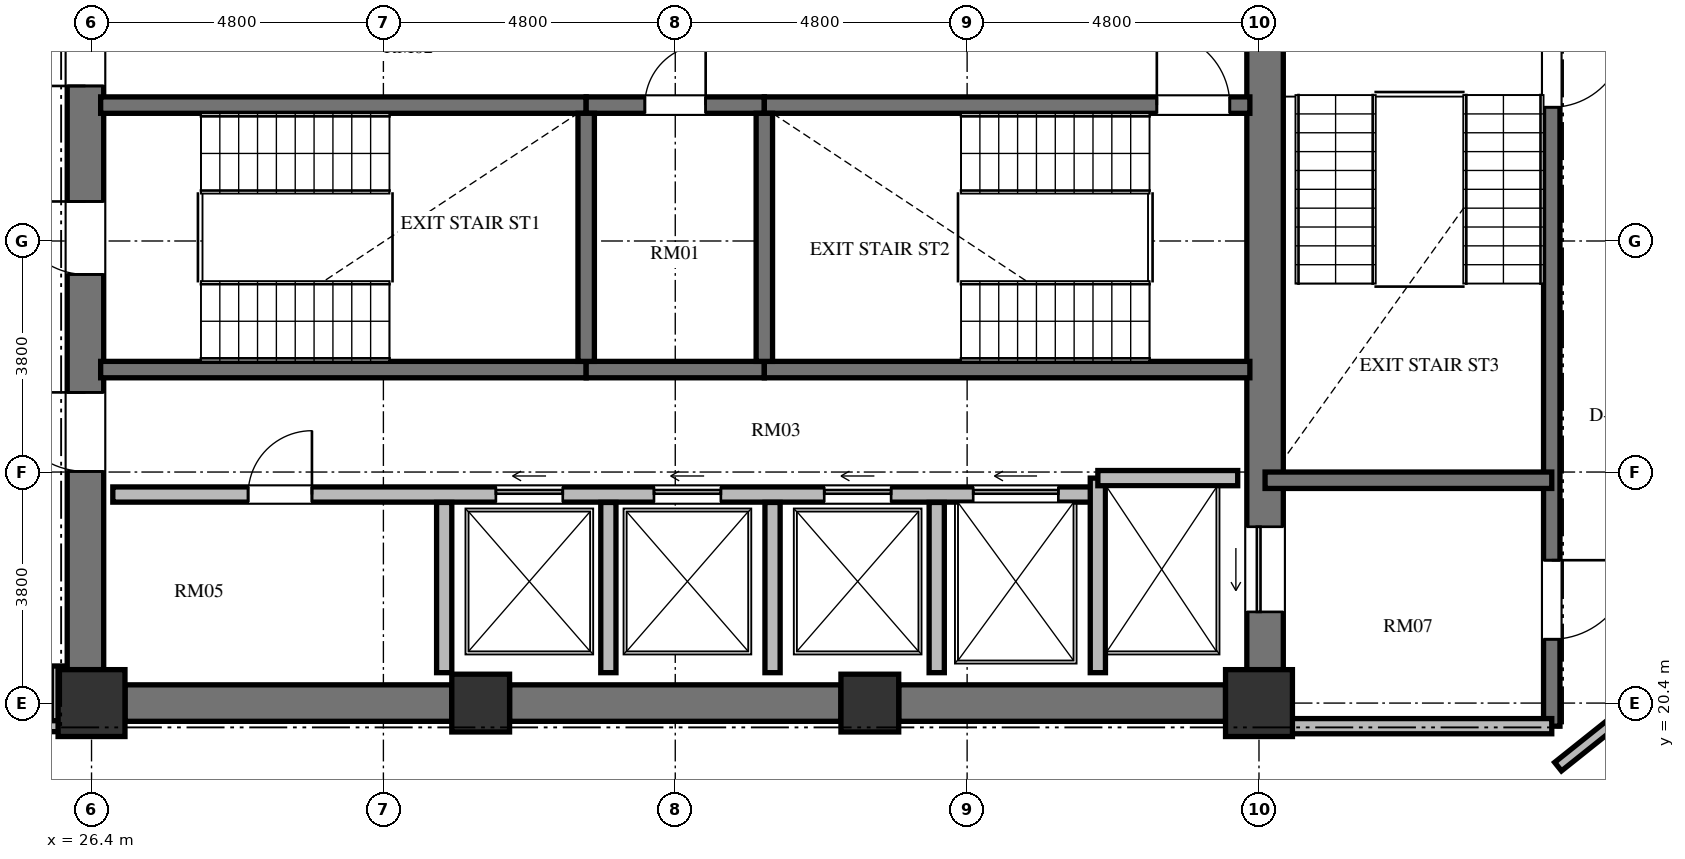
"""IFC4 building model, lengths in metres.
Left out: names, types, materials, properties, quantities, classifications, styles, units other than length and angle.
Written with IfcOpenShell. Run it as: python <this file> out.ifc"""

import sys

from ifc_helpers import new_model, si_unit, direction, frame, frame_2d, origin, origin_2d, place, context, subcontext, project, spatial, rectangle, extrude, element, fill, save


model = new_model("IFC4")
c1 = context("Model", 3, precision=1e-05, world=origin(), true_north=direction((0.0, 1.0)))
c2 = subcontext(c1, "Body", "Model", "MODEL_VIEW")
j1 = project(units=[si_unit("LENGTHUNIT", "METRE"), si_unit("PLANEANGLEUNIT", "RADIAN")], contexts=[c1])
p1 = place(None, origin())
s1 = spatial("IfcSite", under=j1, at=p1, CompositionType="ELEMENT")
p2 = place(p1, origin())
s2 = spatial("IfcBuilding", under=s1, at=p2, CompositionType="ELEMENT")
p3 = place(p2, frame((0.0, 0.0, 171.12)))
s3 = spatial("IfcBuildingStorey", under=s2, at=p3, CompositionType="ELEMENT", Elevation=171.12)
p4 = place(p3, frame((26.4, 20.4, 0.0), z_axis=(0.0, 0.0, 1.0), x_axis=(1.0, 0.0, 0.0)))
e1 = element("IfcColumn", 1, at=p4, inside=s3, PredefinedType="COLUMN", context=c2, shape_type="SweptSolid", body=[
    extrude(rectangle(XDim=1.1, YDim=1.1, at=origin_2d()), origin(), (0.0, 0.0, 1.0), 3.648),
])
for number, where, z_axis, x_axis in (
    (2, (32.8, 20.4, 0.0), (0.0, 0.0, 1.0), (1.0, 0.0, 0.0)),
    (3, (39.2, 20.4, 0.0), (0.0, 0.0, 1.0), (1.0, 0.0, 0.0)),
):
    element("IfcColumn", number, at=place(p3, frame(where, z_axis=z_axis, x_axis=x_axis)), inside=s3, PredefinedType="COLUMN", context=c2, shape_type="SweptSolid", body=[
        extrude(rectangle(XDim=0.95, YDim=0.95, at=origin_2d()), origin(), (0.0, 0.0, 1.0), 3.648),
    ])
p5 = place(p3, frame((45.6, 20.4, 0.0), z_axis=(0.0, 0.0, 1.0), x_axis=(1.0, 0.0, 0.0)))
e4 = element("IfcColumn", 4, at=p5, inside=s3, PredefinedType="COLUMN", context=c2, shape_type="SweptSolid", body=[
    extrude(rectangle(XDim=1.1, YDim=1.1, at=origin_2d()), origin(), (0.0, 0.0, 1.0), 3.648),
])
p6 = place(p3, frame((26.3, 20.95, 0.0), z_axis=(0.0, 0.0, 1.0), x_axis=(0.0, 1.0, 0.0)))
e5 = element("IfcWall", 5, at=p6, inside=s3, PredefinedType="SHEAR", context=c2, shape_type="SweptSolid", body=[
    extrude(rectangle(XDim=14.1, YDim=0.6, at=frame_2d((7.05, 0.0))), origin(), (0.0, 0.0, 1.0), 3.648),
])
p7 = place(p6, frame((6.5, 0.0, 0.0)))
e6 = element("IfcOpeningElement", 6, at=p7, cuts=e5, PredefinedType="OPENING", context=c2, shape_type="SweptSolid", body=[
    extrude(rectangle(XDim=1.2, YDim=2.15, at=frame_2d((0.6, 1.075))), frame((0.0, 0.31, 0.0), z_axis=(0.0, -1.0, 0.0), x_axis=(1.0, 0.0, 0.0)), (0.0, 0.0, 1.0), 0.62),
])
p8 = place(p6, frame((9.6, 0.0, 0.0)))
e7 = element("IfcOpeningElement", 7, at=p8, cuts=e5, PredefinedType="OPENING", context=c2, shape_type="SweptSolid", body=[
    extrude(rectangle(XDim=1.3, YDim=2.2, at=frame_2d((0.65, 1.1))), frame((0.0, 0.31, 0.0), z_axis=(0.0, -1.0, 0.0), x_axis=(1.0, 0.0, 0.0)), (0.0, 0.0, 1.0), 0.62),
])
p9 = place(p6, frame((3.26, 0.0, 0.0)))
e8 = element("IfcOpeningElement", 8, at=p9, cuts=e5, PredefinedType="OPENING", context=c2, shape_type="SweptSolid", body=[
    extrude(rectangle(XDim=1.3, YDim=2.2, at=frame_2d((0.65, 1.1))), frame((0.0, 0.31, 0.0), z_axis=(0.0, -1.0, 0.0), x_axis=(1.0, 0.0, 0.0)), (0.0, 0.0, 1.0), 0.62),
])
p10 = place(p3, frame((45.7, 20.95, 0.0), z_axis=(0.0, 0.0, 1.0), x_axis=(0.0, 1.0, 0.0)))
e9 = element("IfcWall", 9, at=p10, inside=s3, PredefinedType="SHEAR", context=c2, shape_type="SweptSolid", body=[
    extrude(rectangle(XDim=14.1, YDim=0.6, at=frame_2d((7.05, 0.0))), origin(), (0.0, 0.0, 1.0), 3.648),
])
p11 = place(p10, frame((11.75, 0.0, 0.0)))
e10 = element("IfcOpeningElement", 10, at=p11, cuts=e9, PredefinedType="OPENING", context=c2, shape_type="SweptSolid", body=[
    extrude(rectangle(XDim=1.4, YDim=2.3, at=frame_2d((0.7, 1.15))), frame((0.0, 0.31, 0.0), z_axis=(0.0, -1.0, 0.0), x_axis=(1.0, 0.0, 0.0)), (0.0, 0.0, 1.0), 0.62),
])
p12 = place(p10, frame((0.95, 0.0, 0.0)))
e11 = element("IfcOpeningElement", 11, at=p12, cuts=e9, PredefinedType="OPENING", context=c2, shape_type="SweptSolid", body=[
    extrude(rectangle(XDim=1.4, YDim=2.3, at=frame_2d((0.7, 1.15))), frame((0.0, 0.31, 0.0), z_axis=(0.0, -1.0, 0.0), x_axis=(1.0, 0.0, 0.0)), (0.0, 0.0, 1.0), 0.62),
])
p13 = place(p3, frame((26.95, 20.4, 0.0), z_axis=(0.0, 0.0, 1.0), x_axis=(1.0, 0.0, 0.0)))
e12 = element("IfcWall", 12, at=p13, inside=s3, PredefinedType="SHEAR", context=c2, shape_type="SweptSolid", body=[
    extrude(rectangle(XDim=5.375, YDim=0.6, at=frame_2d((2.688, 0.0))), origin(), (0.0, 0.0, 1.0), 3.648),
])
p14 = place(p3, frame((33.275, 20.4, 0.0), z_axis=(0.0, 0.0, 1.0), x_axis=(1.0, 0.0, 0.0)))
e13 = element("IfcWall", 13, at=p14, inside=s3, PredefinedType="SHEAR", context=c2, shape_type="SweptSolid", body=[
    extrude(rectangle(XDim=5.45, YDim=0.6, at=frame_2d((2.725, 0.0))), origin(), (0.0, 0.0, 1.0), 3.648),
])
p15 = place(p3, frame((39.675, 20.4, 0.0), z_axis=(0.0, 0.0, 1.0), x_axis=(1.0, 0.0, 0.0)))
e14 = element("IfcWall", 14, at=p15, inside=s3, PredefinedType="SHEAR", context=c2, shape_type="SweptSolid", body=[
    extrude(rectangle(XDim=5.375, YDim=0.6, at=frame_2d((2.688, 0.0))), origin(), (0.0, 0.0, 1.0), 3.648),
])
p16 = place(p3, frame((26.55, 30.235, 0.0), z_axis=(0.0, 0.0, 1.0), x_axis=(1.0, 0.0, 0.0)))
e15 = element("IfcWall", 15, at=p16, inside=s3, PredefinedType="SHEAR", context=c2, shape_type="SweptSolid", body=[
    extrude(rectangle(XDim=7.985, YDim=0.27, at=frame_2d((3.992, 0.0))), origin(), (0.0, 0.0, 1.0), 3.648),
])
p17 = place(p3, frame((34.535, 30.235, 0.0), z_axis=(0.0, 0.0, 1.0), x_axis=(1.0, 0.0, 0.0)))
e16 = element("IfcWall", 16, at=p17, inside=s3, PredefinedType="SHEAR", context=c2, shape_type="SweptSolid", body=[
    extrude(rectangle(XDim=2.93, YDim=0.27, at=frame_2d((1.465, 0.0))), origin(), (0.0, 0.0, 1.0), 3.648),
])
p18 = place(p17, frame((0.965, 0.0, 0.0)))
e17 = element("IfcOpeningElement", 17, at=p18, cuts=e16, PredefinedType="OPENING", context=c2, shape_type="SweptSolid", body=[
    extrude(rectangle(XDim=1.0, YDim=2.1, at=frame_2d((0.5, 1.05))), frame((0.0, 0.145, 0.0), z_axis=(0.0, -1.0, 0.0), x_axis=(1.0, 0.0, 0.0)), (0.0, 0.0, 1.0), 0.29),
])
p19 = place(p3, frame((37.465, 30.235, 0.0), z_axis=(0.0, 0.0, 1.0), x_axis=(1.0, 0.0, 0.0)))
e18 = element("IfcWall", 18, at=p19, inside=s3, PredefinedType="SHEAR", context=c2, shape_type="SweptSolid", body=[
    extrude(rectangle(XDim=7.985, YDim=0.27, at=frame_2d((3.992, 0.0))), origin(), (0.0, 0.0, 1.0), 3.648),
])
p20 = place(p19, frame((6.455, 0.0, 0.0)))
e19 = element("IfcOpeningElement", 19, at=p20, cuts=e18, PredefinedType="OPENING", context=c2, shape_type="SweptSolid", body=[
    extrude(rectangle(XDim=1.2, YDim=2.15, at=frame_2d((0.6, 1.075))), frame((0.0, 0.145, 0.0), z_axis=(0.0, -1.0, 0.0), x_axis=(1.0, 0.0, 0.0)), (0.0, 0.0, 1.0), 0.29),
])
p21 = place(p3, frame((26.55, 25.885, 0.0), z_axis=(0.0, 0.0, 1.0), x_axis=(1.0, 0.0, 0.0)))
e20 = element("IfcWall", 20, at=p21, inside=s3, PredefinedType="SHEAR", context=c2, shape_type="SweptSolid", body=[
    extrude(rectangle(XDim=7.985, YDim=0.27, at=frame_2d((3.992, 0.0))), origin(), (0.0, 0.0, 1.0), 3.648),
])
p22 = place(p3, frame((34.535, 25.885, 0.0), z_axis=(0.0, 0.0, 1.0), x_axis=(1.0, 0.0, 0.0)))
e21 = element("IfcWall", 21, at=p22, inside=s3, PredefinedType="SHEAR", context=c2, shape_type="SweptSolid", body=[
    extrude(rectangle(XDim=2.93, YDim=0.27, at=frame_2d((1.465, 0.0))), origin(), (0.0, 0.0, 1.0), 3.648),
])
p23 = place(p3, frame((37.465, 25.885, 0.0), z_axis=(0.0, 0.0, 1.0), x_axis=(1.0, 0.0, 0.0)))
e22 = element("IfcWall", 22, at=p23, inside=s3, PredefinedType="SHEAR", context=c2, shape_type="SweptSolid", body=[
    extrude(rectangle(XDim=7.985, YDim=0.27, at=frame_2d((3.992, 0.0))), origin(), (0.0, 0.0, 1.0), 3.648),
])
for number, where, z_axis, x_axis in (
    (23, (34.535, 26.02, 0.0), (0.0, 0.0, 1.0), (0.0, 1.0, 0.0)),
    (24, (37.465, 26.02, 0.0), (0.0, 0.0, 1.0), (0.0, 1.0, 0.0)),
):
    element("IfcWall", number, at=place(p3, frame(where, z_axis=z_axis, x_axis=x_axis)), inside=s3, PredefinedType="SHEAR", context=c2, shape_type="SweptSolid", body=[
        extrude(rectangle(XDim=4.08, YDim=0.27, at=frame_2d((2.04, 0.0))), origin(), (0.0, 0.0, 1.0), 3.648),
    ])
p24 = place(p3, frame((26.75, 23.83, 0.0), z_axis=(0.0, 0.0, 1.0), x_axis=(1.0, 0.0, 0.0)))
e25 = element("IfcWall", 25, at=p24, inside=s3, PredefinedType="SOLIDWALL", context=c2, shape_type="SweptSolid", body=[
    extrude(rectangle(XDim=16.2, YDim=0.25, at=frame_2d((8.1, 0.0))), origin(), (0.0, 0.0, 1.0), 3.428),
])
p25 = place(p24, frame((2.225, 0.0, 0.0)))
e26 = element("IfcOpeningElement", 26, at=p25, cuts=e25, PredefinedType="OPENING", context=c2, shape_type="SweptSolid", body=[
    extrude(rectangle(XDim=1.05, YDim=2.15, at=frame_2d((0.525, 1.075))), frame((0.0, 0.135, 0.0), z_axis=(0.0, -1.0, 0.0), x_axis=(1.0, 0.0, 0.0)), (0.0, 0.0, 1.0), 0.27),
])
p26 = place(p24, frame((6.3, 0.0, 0.0)))
e27 = element("IfcOpeningElement", 27, at=p26, cuts=e25, PredefinedType="OPENING", context=c2, shape_type="SweptSolid", body=[
    extrude(rectangle(XDim=1.1, YDim=2.2, at=frame_2d((0.55, 1.1))), frame((0.0, 0.135, 0.0), z_axis=(0.0, -1.0, 0.0), x_axis=(1.0, 0.0, 0.0)), (0.0, 0.0, 1.0), 0.27),
])
p27 = place(p24, frame((8.9, 0.0, 0.0)))
e28 = element("IfcOpeningElement", 28, at=p27, cuts=e25, PredefinedType="OPENING", context=c2, shape_type="SweptSolid", body=[
    extrude(rectangle(XDim=1.1, YDim=2.2, at=frame_2d((0.55, 1.1))), frame((0.0, 0.135, 0.0), z_axis=(0.0, -1.0, 0.0), x_axis=(1.0, 0.0, 0.0)), (0.0, 0.0, 1.0), 0.27),
])
p28 = place(p24, frame((11.7, 0.0, 0.0)))
e29 = element("IfcOpeningElement", 29, at=p28, cuts=e25, PredefinedType="OPENING", context=c2, shape_type="SweptSolid", body=[
    extrude(rectangle(XDim=1.1, YDim=2.2, at=frame_2d((0.55, 1.1))), frame((0.0, 0.135, 0.0), z_axis=(0.0, -1.0, 0.0), x_axis=(1.0, 0.0, 0.0)), (0.0, 0.0, 1.0), 0.27),
])
p29 = place(p24, frame((14.15, 0.0, 0.0)))
e30 = element("IfcOpeningElement", 30, at=p29, cuts=e25, PredefinedType="OPENING", context=c2, shape_type="SweptSolid", body=[
    extrude(rectangle(XDim=1.4, YDim=2.3, at=frame_2d((0.7, 1.15))), frame((0.0, 0.135, 0.0), z_axis=(0.0, -1.0, 0.0), x_axis=(1.0, 0.0, 0.0)), (0.0, 0.0, 1.0), 0.27),
])
p30 = place(p3, frame((42.95, 20.9, 0.0), z_axis=(0.0, 0.0, 1.0), x_axis=(0.0, 1.0, 0.0)))
e31 = element("IfcWall", 31, at=p30, inside=s3, PredefinedType="SOLIDWALL", context=c2, shape_type="SweptSolid", body=[
    extrude(rectangle(XDim=3.2, YDim=0.25, at=frame_2d((1.6, 0.0))), origin(), (0.0, 0.0, 1.0), 3.428),
])
p31 = place(p3, frame((42.95, 24.1, 0.0), z_axis=(0.0, 0.0, 1.0), x_axis=(1.0, 0.0, 0.0)))
e32 = element("IfcWall", 32, at=p31, inside=s3, PredefinedType="SOLIDWALL", context=c2, shape_type="SweptSolid", body=[
    extrude(rectangle(XDim=2.3, YDim=0.25, at=frame_2d((1.15, 0.0))), origin(), (0.0, 0.0, 1.0), 3.428),
])
for number, where, z_axis, x_axis in (
    (33, (32.2, 20.9, 0.0), (0.0, 0.0, 1.0), (0.0, 1.0, 0.0)),
    (34, (34.9, 20.9, 0.0), (0.0, 0.0, 1.0), (0.0, 1.0, 0.0)),
    (35, (37.6, 20.9, 0.0), (0.0, 0.0, 1.0), (0.0, 1.0, 0.0)),
    (36, (40.3, 20.9, 0.0), (0.0, 0.0, 1.0), (0.0, 1.0, 0.0)),
):
    element("IfcWall", number, at=place(p3, frame(where, z_axis=z_axis, x_axis=x_axis)), inside=s3, PredefinedType="SOLIDWALL", context=c2, shape_type="SweptSolid", body=[
        extrude(rectangle(XDim=2.8, YDim=0.25, at=frame_2d((1.4, 0.0))), origin(), (0.0, 0.0, 1.0), 3.428),
    ])
p32 = place(p3, frame((50.415, 35.845, 0.0), z_axis=(0.0, 0.0, 1.0), x_axis=(0.0, -1.0, 0.0)))
e37 = element("IfcWall", 37, at=p32, inside=s3, PredefinedType="SHEAR", context=c2, shape_type="SweptSolid", body=[
    extrude(rectangle(XDim=15.825, YDim=0.27, at=frame_2d((7.913, 0.0))), origin(), (0.0, 0.0, 1.0), 3.648),
])
p33 = place(p32, frame((4.445, 0.0, 0.0)))
e38 = element("IfcOpeningElement", 38, at=p33, cuts=e37, PredefinedType="OPENING", context=c2, shape_type="SweptSolid", body=[
    extrude(rectangle(XDim=1.2, YDim=2.15, at=frame_2d((0.6, 1.075))), frame((0.0, 0.145, 0.0), z_axis=(0.0, -1.0, 0.0), x_axis=(1.0, 0.0, 0.0)), (0.0, 0.0, 1.0), 0.29),
])
p34 = place(p32, frame((1.295, 0.0, 0.0)))
e39 = element("IfcOpeningElement", 39, at=p34, cuts=e37, PredefinedType="OPENING", context=c2, shape_type="SweptSolid", body=[
    extrude(rectangle(XDim=1.3, YDim=2.2, at=frame_2d((0.65, 1.1))), frame((0.0, 0.145, 0.0), z_axis=(0.0, -1.0, 0.0), x_axis=(1.0, 0.0, 0.0)), (0.0, 0.0, 1.0), 0.29),
])
p35 = place(p32, frame((13.095, 0.0, 0.0)))
e40 = element("IfcOpeningElement", 40, at=p35, cuts=e37, PredefinedType="OPENING", context=c2, shape_type="SweptSolid", body=[
    extrude(rectangle(XDim=1.3, YDim=2.2, at=frame_2d((0.65, 1.1))), frame((0.0, 0.145, 0.0), z_axis=(0.0, -1.0, 0.0), x_axis=(1.0, 0.0, 0.0)), (0.0, 0.0, 1.0), 0.29),
])
p36 = place(p3, frame((45.7, 24.065, 0.0), z_axis=(0.0, 0.0, 1.0), x_axis=(1.0, 0.0, 0.0)))
e41 = element("IfcWall", 41, at=p36, inside=s3, PredefinedType="SHEAR", context=c2, shape_type="SweptSolid", body=[
    extrude(rectangle(XDim=4.715, YDim=0.27, at=frame_2d((2.357, 0.0))), origin(), (0.0, 0.0, 1.0), 3.648),
])
p37 = place(p3, frame((45.7, 20.02, 0.0), z_axis=(0.0, 0.0, 1.0), x_axis=(1.0, 0.0, 0.0)))
e42 = element("IfcWall", 42, at=p37, inside=s3, PredefinedType="SOLIDWALL", context=c2, shape_type="SweptSolid", body=[
    extrude(rectangle(XDim=4.715, YDim=0.25, at=frame_2d((2.357, 0.0))), origin(), (0.0, 0.0, 1.0), 3.428),
])
p38 = place(p3, frame((53.181, 21.481, 0.0), z_axis=(0.0, 0.0, 1.0), x_axis=(-0.781420737726, -0.624004511724, 0.0)))
e43 = element("IfcWall", 43, at=p38, inside=s3, PredefinedType="PARTITIONING", context=c2, shape_type="SweptSolid", body=[
    extrude(rectangle(XDim=3.407, YDim=0.18, at=frame_2d((1.704, 0.0))), origin(), (0.0, 0.0, 1.0), 3.428),
])
p39 = place(p3, frame((25.83, 21.01, 0.0), z_axis=(0.0, 0.0, 1.0), x_axis=(0.0, -1.0, 0.0)))
e44 = element("IfcWall", 44, at=p39, inside=s3, PredefinedType="PARTITIONING", context=c2, shape_type="SweptSolid", body=[
    extrude(rectangle(XDim=1.03, YDim=0.18, at=frame_2d((0.515, 0.0))), origin(), (0.0, 0.0, 1.0), 3.428),
])
p40 = place(p3, frame((25.87, 20.02, 0.0), z_axis=(0.0, 0.0, 1.0), x_axis=(-1.0, 0.0, 0.0)))
e45 = element("IfcWall", 45, at=p40, inside=s3, PredefinedType="PARTITIONING", context=c2, shape_type="SweptSolid", body=[
    extrude(rectangle(XDim=2.56, YDim=0.18, at=frame_2d((1.28, 0.0))), origin(), (0.0, 0.0, 1.0), 3.428),
])
p41 = place(p7, origin())
e46 = element("IfcDoor", 46, at=p41, inside=s3, OperationType="SINGLE_SWING_RIGHT", PredefinedType="DOOR", context=c2, shape_type="SweptSolid", body=[
    extrude(rectangle(XDim=1.2, YDim=2.15, at=frame_2d((0.6, 1.075))), frame((0.0, 0.025, 0.0), z_axis=(0.0, -1.0, 0.0), x_axis=(1.0, 0.0, 0.0)), (0.0, 0.0, 1.0), 0.05),
])
fill(e6, e46)
p42 = place(p20, origin())
e47 = element("IfcDoor", 47, at=p42, inside=s3, OperationType="SINGLE_SWING_LEFT", PredefinedType="DOOR", context=c2, shape_type="SweptSolid", body=[
    extrude(rectangle(XDim=1.2, YDim=2.15, at=frame_2d((0.6, 1.075))), frame((0.0, 0.025, 0.0), z_axis=(0.0, -1.0, 0.0), x_axis=(1.0, 0.0, 0.0)), (0.0, 0.0, 1.0), 0.05),
])
fill(e19, e47)
p43 = place(p18, origin())
e48 = element("IfcDoor", 48, at=p43, inside=s3, OperationType="SINGLE_SWING_RIGHT", PredefinedType="DOOR", context=c2, shape_type="SweptSolid", body=[
    extrude(rectangle(XDim=1.0, YDim=2.1, at=frame_2d((0.5, 1.05))), frame((0.0, 0.025, 0.0), z_axis=(0.0, -1.0, 0.0), x_axis=(1.0, 0.0, 0.0)), (0.0, 0.0, 1.0), 0.05),
])
fill(e17, e48)
p44 = place(p8, origin())
e49 = element("IfcDoor", 49, at=p44, inside=s3, OperationType="SINGLE_SWING_LEFT", PredefinedType="DOOR", context=c2, shape_type="SweptSolid", body=[
    extrude(rectangle(XDim=1.3, YDim=2.2, at=frame_2d((0.65, 1.1))), frame((0.0, 0.025, 0.0), z_axis=(0.0, -1.0, 0.0), x_axis=(1.0, 0.0, 0.0)), (0.0, 0.0, 1.0), 0.05),
])
fill(e7, e49)
p45 = place(p9, origin())
e50 = element("IfcDoor", 50, at=p45, inside=s3, OperationType="SINGLE_SWING_RIGHT", PredefinedType="DOOR", context=c2, shape_type="SweptSolid", body=[
    extrude(rectangle(XDim=1.3, YDim=2.2, at=frame_2d((0.65, 1.1))), frame((0.0, 0.025, 0.0), z_axis=(0.0, -1.0, 0.0), x_axis=(1.0, 0.0, 0.0)), (0.0, 0.0, 1.0), 0.05),
])
fill(e8, e50)
p46 = place(p25, origin())
e51 = element("IfcDoor", 51, at=p46, inside=s3, OperationType="SINGLE_SWING_RIGHT", PredefinedType="DOOR", context=c2, shape_type="SweptSolid", body=[
    extrude(rectangle(XDim=1.05, YDim=2.15, at=frame_2d((0.525, 1.075))), frame((0.0, 0.025, 0.0), z_axis=(0.0, -1.0, 0.0), x_axis=(1.0, 0.0, 0.0)), (0.0, 0.0, 1.0), 0.05),
])
fill(e26, e51)
p47 = place(p26, origin())
e52 = element("IfcDoor", 52, at=p47, inside=s3, OperationType="SLIDING_TO_LEFT", PredefinedType="DOOR", context=c2, shape_type="SweptSolid", body=[
    extrude(rectangle(XDim=1.1, YDim=2.2, at=frame_2d((0.55, 1.1))), frame((0.0, 0.025, 0.0), z_axis=(0.0, -1.0, 0.0), x_axis=(1.0, 0.0, 0.0)), (0.0, 0.0, 1.0), 0.05),
])
fill(e27, e52)
p48 = place(p27, origin())
e53 = element("IfcDoor", 53, at=p48, inside=s3, OperationType="SLIDING_TO_LEFT", PredefinedType="DOOR", context=c2, shape_type="SweptSolid", body=[
    extrude(rectangle(XDim=1.1, YDim=2.2, at=frame_2d((0.55, 1.1))), frame((0.0, 0.025, 0.0), z_axis=(0.0, -1.0, 0.0), x_axis=(1.0, 0.0, 0.0)), (0.0, 0.0, 1.0), 0.05),
])
fill(e28, e53)
p49 = place(p28, origin())
e54 = element("IfcDoor", 54, at=p49, inside=s3, OperationType="SLIDING_TO_LEFT", PredefinedType="DOOR", context=c2, shape_type="SweptSolid", body=[
    extrude(rectangle(XDim=1.1, YDim=2.2, at=frame_2d((0.55, 1.1))), frame((0.0, 0.025, 0.0), z_axis=(0.0, -1.0, 0.0), x_axis=(1.0, 0.0, 0.0)), (0.0, 0.0, 1.0), 0.05),
])
fill(e29, e54)
p50 = place(p12, origin())
e55 = element("IfcDoor", 55, at=p50, inside=s3, OperationType="SLIDING_TO_LEFT", PredefinedType="DOOR", context=c2, shape_type="SweptSolid", body=[
    extrude(rectangle(XDim=1.4, YDim=2.3, at=frame_2d((0.7, 1.15))), frame((0.0, 0.025, 0.0), z_axis=(0.0, -1.0, 0.0), x_axis=(1.0, 0.0, 0.0)), (0.0, 0.0, 1.0), 0.05),
])
fill(e11, e55)
p51 = place(p29, origin())
e56 = element("IfcDoor", 56, at=p51, inside=s3, OperationType="SLIDING_TO_LEFT", PredefinedType="DOOR", context=c2, shape_type="SweptSolid", body=[
    extrude(rectangle(XDim=1.4, YDim=2.3, at=frame_2d((0.7, 1.15))), frame((0.0, 0.025, 0.0), z_axis=(0.0, -1.0, 0.0), x_axis=(1.0, 0.0, 0.0)), (0.0, 0.0, 1.0), 0.05),
])
fill(e30, e56)
p52 = place(p33, origin())
e57 = element("IfcDoor", 57, at=p52, inside=s3, OperationType="SINGLE_SWING_LEFT", PredefinedType="DOOR", context=c2, shape_type="SweptSolid", body=[
    extrude(rectangle(XDim=1.2, YDim=2.15, at=frame_2d((0.6, 1.075))), frame((0.0, 0.025, 0.0), z_axis=(0.0, -1.0, 0.0), x_axis=(1.0, 0.0, 0.0)), (0.0, 0.0, 1.0), 0.05),
])
fill(e38, e57)
p53 = place(p35, origin())
e58 = element("IfcDoor", 58, at=p53, inside=s3, OperationType="SINGLE_SWING_LEFT", PredefinedType="DOOR", context=c2, shape_type="SweptSolid", body=[
    extrude(rectangle(XDim=1.3, YDim=2.2, at=frame_2d((0.65, 1.1))), frame((0.0, 0.025, 0.0), z_axis=(0.0, -1.0, 0.0), x_axis=(1.0, 0.0, 0.0)), (0.0, 0.0, 1.0), 0.05),
])
fill(e40, e58)
save(model, sys.argv[1])
